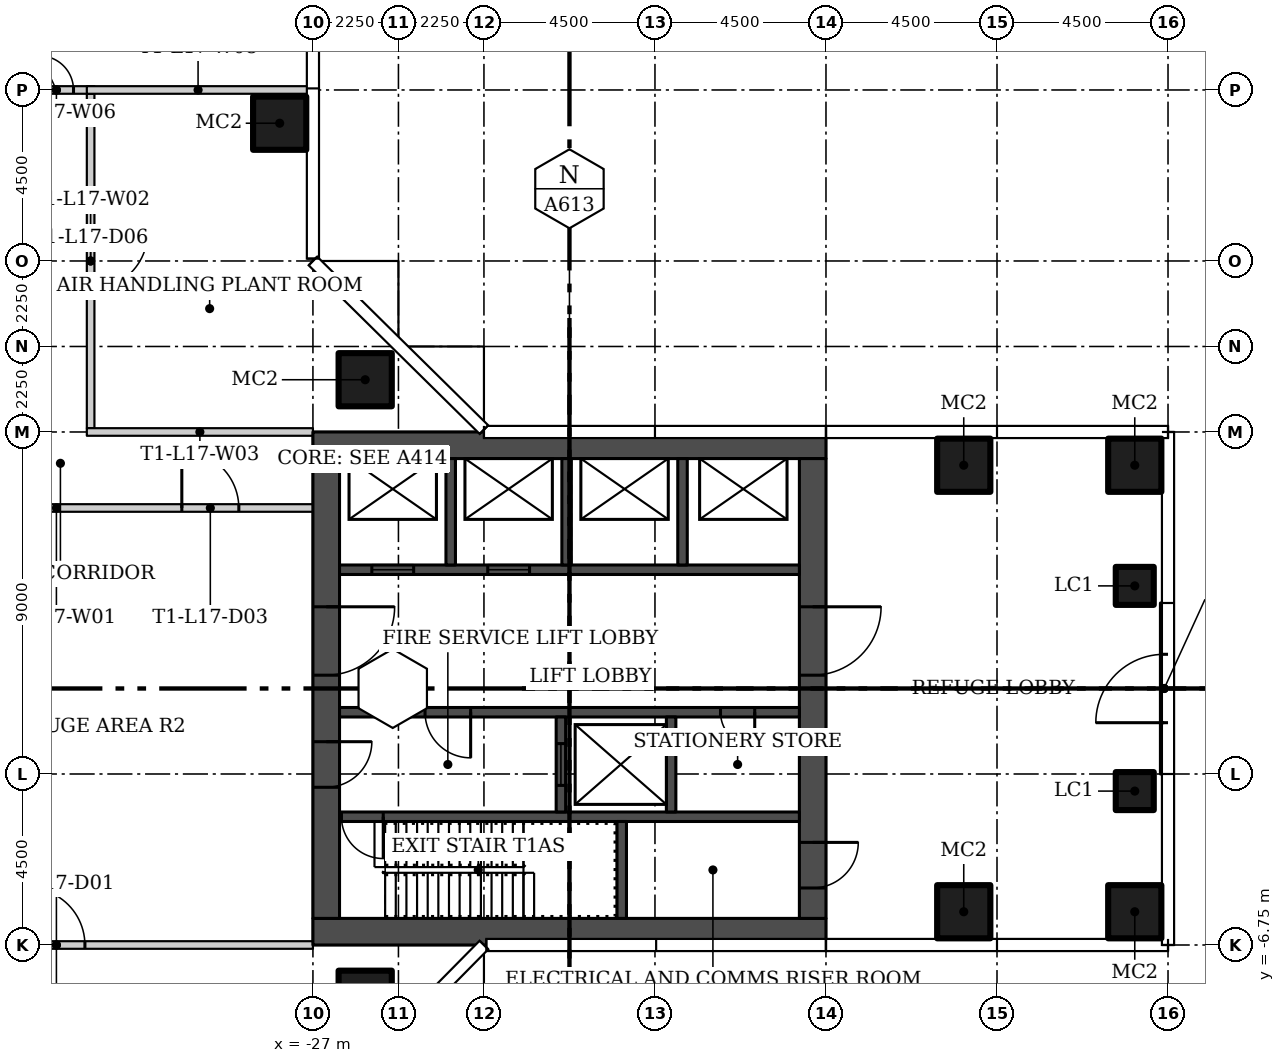
"""IFC4 building model, lengths in metres.
Left out: names, types, materials, properties, quantities, classifications, styles, units other than length and angle.
Written with IfcOpenShell. Run it as: python <this file> out.ifc"""

import sys

from ifc_helpers import new_model, si_unit, direction, frame, frame_2d, origin, origin_2d, place, context, subcontext, project, spatial, rectangle, hollow_rectangle, extrude, element, fill, save


model = new_model("IFC4")
c1 = context("Model", 3, precision=1e-05, world=origin(), true_north=direction((0.0, 1.0)))
c2 = subcontext(c1, "Body", "Model", "MODEL_VIEW")
j1 = project(units=[si_unit("LENGTHUNIT", "METRE"), si_unit("PLANEANGLEUNIT", "RADIAN")], contexts=[c1])
p1 = place(None, origin())
s1 = spatial("IfcSite", under=j1, at=p1, CompositionType="ELEMENT")
p2 = place(p1, origin())
s2 = spatial("IfcBuilding", under=s1, at=p2, CompositionType="ELEMENT")
p3 = place(p2, frame((0.0, 0.0, 77.1)))
s3 = spatial("IfcBuildingStorey", under=s2, at=p3, CompositionType="ELEMENT", Elevation=77.1)
for number, where in (
    (1, (-25.625, 8.125, 0.0)),
    (2, (-25.625, -8.125, 0.0)),
    (3, (-9.875, -5.875, 0.0)),
    (4, (-5.375, -5.875, 0.0)),
    (5, (-9.875, 5.875, 0.0)),
    (6, (-5.375, 5.875, 0.0)),
    (7, (-27.875, 14.875, 0.0)),
):
    element("IfcColumn", number, at=place(p3, frame(where)), inside=s3, PredefinedType="COLUMN", context=c2, shape_type="SweptSolid", body=[
        extrude(hollow_rectangle(XDim=1.4, YDim=1.4, WallThickness=0.05, at=origin_2d()), origin(), (0.0, 0.0, 1.0), 4.45),
    ])
for number, where in (
    (8, (-5.375, -2.7, 0.0)),
    (9, (-5.375, 2.7, 0.0)),
):
    element("IfcColumn", number, at=place(p3, frame(where)), inside=s3, PredefinedType="COLUMN", context=c2, shape_type="SweptSolid", body=[
        extrude(hollow_rectangle(XDim=1.0, YDim=1.0, WallThickness=0.04, at=origin_2d()), origin(), (0.0, 0.0, 1.0), 4.45),
    ])
p4 = place(p3, frame((-40.5, 4.75, 0.0)))
e10 = element("IfcWall", 10, at=p4, inside=s3, PredefinedType="PARTITIONING", context=c2, shape_type="SweptSolid", body=[
    extrude(rectangle(XDim=13.5, YDim=0.2, at=frame_2d((6.75, 0.0))), origin(), (0.0, 0.0, 1.0), 4.45),
])
p5 = place(p4, frame((1.95, 0.0, 0.0)))
e11 = element("IfcOpeningElement", 11, at=p5, cuts=e10, PredefinedType="OPENING", context=c2, shape_type="SweptSolid", body=[
    extrude(rectangle(XDim=1.5, YDim=2.4, at=frame_2d((0.75, 1.2))), frame((0.0, 0.11, 0.0), z_axis=(0.0, -1.0, 0.0), x_axis=(1.0, 0.0, 0.0)), (0.0, 0.0, 1.0), 0.22),
])
p6 = place(p4, frame((10.05, 0.0, 0.0)))
e12 = element("IfcOpeningElement", 12, at=p6, cuts=e10, PredefinedType="OPENING", context=c2, shape_type="SweptSolid", body=[
    extrude(rectangle(XDim=1.5, YDim=2.4, at=frame_2d((0.75, 1.2))), frame((0.0, 0.11, 0.0), z_axis=(0.0, -1.0, 0.0), x_axis=(1.0, 0.0, 0.0)), (0.0, 0.0, 1.0), 0.22),
])
p7 = place(p3, frame((-32.85, 15.65, 0.0), z_axis=(0.0, 0.0, 1.0), x_axis=(0.0, -1.0, 0.0)))
e13 = element("IfcWall", 13, at=p7, inside=s3, PredefinedType="PARTITIONING", context=c2, shape_type="SweptSolid", body=[
    extrude(rectangle(XDim=8.8, YDim=0.2, at=frame_2d((4.4, 0.0))), origin(), (0.0, 0.0, 1.0), 4.45),
])
p8 = place(p7, frame((3.65, 0.0, 0.0)))
e14 = element("IfcOpeningElement", 14, at=p8, cuts=e13, PredefinedType="OPENING", context=c2, shape_type="SweptSolid", body=[
    extrude(rectangle(XDim=1.5, YDim=2.4, at=frame_2d((0.75, 1.2))), frame((0.0, 0.11, 0.0), z_axis=(0.0, -1.0, 0.0), x_axis=(1.0, 0.0, 0.0)), (0.0, 0.0, 1.0), 0.22),
])
p9 = place(p3, frame((-32.95, 6.75, 0.0)))
e15 = element("IfcWall", 15, at=p9, inside=s3, PredefinedType="PARTITIONING", context=c2, shape_type="SweptSolid", body=[
    extrude(rectangle(XDim=5.95, YDim=0.2, at=frame_2d((2.975, 0.0))), origin(), (0.0, 0.0, 1.0), 4.45),
])
p10 = place(p3, frame((-34.75, 15.75, 0.0)))
e16 = element("IfcWall", 16, at=p10, inside=s3, PredefinedType="PARTITIONING", context=c2, shape_type="SweptSolid", body=[
    extrude(rectangle(XDim=2.001, YDim=0.2, at=frame_2d((1.0, 0.0))), origin(), (0.0, 0.0, 1.0), 4.45),
])
p11 = place(p10, frame((0.55, 0.0, 0.0)))
e17 = element("IfcOpeningElement", 17, at=p11, cuts=e16, PredefinedType="OPENING", context=c2, shape_type="SweptSolid", body=[
    extrude(rectangle(XDim=0.9, YDim=2.4, at=frame_2d((0.45, 1.2))), frame((0.0, 0.11, 0.0), z_axis=(0.0, -1.0, 0.0), x_axis=(1.0, 0.0, 0.0)), (0.0, 0.0, 1.0), 0.22),
])
p12 = place(p3, frame((-40.5, -6.75, 0.0)))
e18 = element("IfcWall", 18, at=p12, inside=s3, PredefinedType="PARTITIONING", context=c2, shape_type="SweptSolid", body=[
    extrude(rectangle(XDim=13.5, YDim=0.2, at=frame_2d((6.75, 0.0))), origin(), (0.0, 0.0, 1.0), 4.45),
])
p13 = place(p12, frame((6.0, 0.0, 0.0)))
e19 = element("IfcOpeningElement", 19, at=p13, cuts=e18, PredefinedType="OPENING", context=c2, shape_type="SweptSolid", body=[
    extrude(rectangle(XDim=1.5, YDim=2.4, at=frame_2d((0.75, 1.2))), frame((0.0, 0.11, 0.0), z_axis=(0.0, -1.0, 0.0), x_axis=(1.0, 0.0, 0.0)), (0.0, 0.0, 1.0), 0.22),
])
p14 = place(p3, frame((-27.095, 15.75, 0.0), z_axis=(0.0, 0.0, 1.0), x_axis=(-1.0, 0.0, 0.0)))
e20 = element("IfcWall", 20, at=p14, inside=s3, PredefinedType="PARTITIONING", context=c2, shape_type="SweptSolid", body=[
    extrude(rectangle(XDim=5.855, YDim=0.2, at=frame_2d((2.927, 0.0))), origin(), (0.0, 0.0, 1.0), 4.45),
])
p15 = place(p3, frame((-4.6, -2.25, 0.0), z_axis=(0.0, 0.0, 1.0), x_axis=(0.0, 1.0, 0.0)))
e21 = element("IfcWall", 21, at=p15, inside=s3, PredefinedType="PARTITIONING", context=c2, shape_type="SweptSolid", body=[
    extrude(rectangle(XDim=4.5, YDim=0.2, at=frame_2d((2.25, 0.0))), origin(), (0.0, 0.0, 1.0), 4.45),
])
p16 = place(p15, frame((1.35, 0.0, 0.0)))
e22 = element("IfcOpeningElement", 22, at=p16, cuts=e21, PredefinedType="OPENING", context=c2, shape_type="SweptSolid", body=[
    extrude(rectangle(XDim=1.8, YDim=2.1, at=frame_2d((0.9, 1.05))), frame((0.0, 0.11, 0.0), z_axis=(0.0, -1.0, 0.0), x_axis=(1.0, 0.0, 0.0)), (0.0, 0.0, 1.0), 0.22),
])
for number, where in (
    (23, (-27.0, -6.4, 0.0)),
    (24, (-27.0, 6.4, 0.0)),
):
    element("IfcWall", number, at=place(p3, frame(where)), inside=s3, PredefinedType="SHEAR", context=c2, shape_type="SweptSolid", body=[
        extrude(rectangle(XDim=13.5, YDim=0.7, at=frame_2d((6.75, 0.0))), origin(), (0.0, 0.0, 1.0), 4.45),
    ])
p17 = place(p3, frame((-26.65, 6.05, 0.0), z_axis=(0.0, 0.0, 1.0), x_axis=(0.0, -1.0, 0.0)))
e25 = element("IfcWall", 25, at=p17, inside=s3, PredefinedType="SHEAR", context=c2, shape_type="SweptSolid", body=[
    extrude(rectangle(XDim=12.1, YDim=0.7, at=frame_2d((6.05, 0.0))), origin(), (0.0, 0.0, 1.0), 4.45),
])
p18 = place(p17, frame((7.45, 0.0, 0.0)))
e26 = element("IfcOpeningElement", 26, at=p18, cuts=e25, PredefinedType="OPENING", context=c2, shape_type="SweptSolid", body=[
    extrude(rectangle(XDim=1.2, YDim=2.1, at=frame_2d((0.6, 1.05))), frame((0.0, 0.36, 0.0), z_axis=(0.0, -1.0, 0.0), x_axis=(1.0, 0.0, 0.0)), (0.0, 0.0, 1.0), 0.72),
])
p19 = place(p17, frame((3.9, 0.0, 0.0)))
e27 = element("IfcOpeningElement", 27, at=p19, cuts=e25, PredefinedType="OPENING", context=c2, shape_type="SweptSolid", body=[
    extrude(rectangle(XDim=1.8, YDim=2.4, at=frame_2d((0.9, 1.2))), frame((0.0, 0.36, 0.0), z_axis=(0.0, -1.0, 0.0), x_axis=(1.0, 0.0, 0.0)), (0.0, 0.0, 1.0), 0.72),
])
p20 = place(p3, frame((-13.85, 6.05, 0.0), z_axis=(0.0, 0.0, 1.0), x_axis=(0.0, -1.0, 0.0)))
e28 = element("IfcWall", 28, at=p20, inside=s3, PredefinedType="SHEAR", context=c2, shape_type="SweptSolid", body=[
    extrude(rectangle(XDim=12.1, YDim=0.7, at=frame_2d((6.05, 0.0))), origin(), (0.0, 0.0, 1.0), 4.45),
])
p21 = place(p20, frame((10.1, 0.0, 0.0)))
e29 = element("IfcOpeningElement", 29, at=p21, cuts=e28, PredefinedType="OPENING", context=c2, shape_type="SweptSolid", body=[
    extrude(rectangle(XDim=1.2, YDim=2.1, at=frame_2d((0.6, 1.05))), frame((0.0, 0.36, 0.0), z_axis=(0.0, -1.0, 0.0), x_axis=(1.0, 0.0, 0.0)), (0.0, 0.0, 1.0), 0.72),
])
p22 = place(p20, frame((3.9, 0.0, 0.0)))
e30 = element("IfcOpeningElement", 30, at=p22, cuts=e28, PredefinedType="OPENING", context=c2, shape_type="SweptSolid", body=[
    extrude(rectangle(XDim=1.8, YDim=2.4, at=frame_2d((0.9, 1.2))), frame((0.0, 0.36, 0.0), z_axis=(0.0, -1.0, 0.0), x_axis=(1.0, 0.0, 0.0)), (0.0, 0.0, 1.0), 0.72),
])
p23 = place(p3, frame((-14.2, -3.375, 0.0), z_axis=(0.0, 0.0, 1.0), x_axis=(-1.0, 0.0, 0.0)))
e31 = element("IfcWall", 31, at=p23, inside=s3, PredefinedType="SHEAR", context=c2, shape_type="SweptSolid", body=[
    extrude(rectangle(XDim=12.1, YDim=0.25, at=frame_2d((6.05, 0.0))), origin(), (0.0, 0.0, 1.0), 4.45),
])
p24 = place(p23, frame((10.95, 0.0, 0.0)))
e32 = element("IfcOpeningElement", 32, at=p24, cuts=e31, PredefinedType="OPENING", context=c2, shape_type="SweptSolid", body=[
    extrude(rectangle(XDim=1.1, YDim=2.1, at=frame_2d((0.55, 1.05))), frame((0.0, 0.135, 0.0), z_axis=(0.0, -1.0, 0.0), x_axis=(1.0, 0.0, 0.0)), (0.0, 0.0, 1.0), 0.27),
])
p25 = place(p3, frame((-18.875, -6.05, 0.0), z_axis=(0.0, 0.0, 1.0), x_axis=(0.0, 1.0, 0.0)))
e33 = element("IfcWall", 33, at=p25, inside=s3, PredefinedType="SHEAR", context=c2, shape_type="SweptSolid", body=[
    extrude(rectangle(XDim=2.55, YDim=0.25, at=frame_2d((1.275, 0.0))), origin(), (0.0, 0.0, 1.0), 4.45),
])
p26 = place(p3, frame((-14.2, -0.625, 0.0), z_axis=(0.0, 0.0, 1.0), x_axis=(-1.0, 0.0, 0.0)))
e34 = element("IfcWall", 34, at=p26, inside=s3, PredefinedType="SHEAR", context=c2, shape_type="SweptSolid", body=[
    extrude(rectangle(XDim=12.1, YDim=0.25, at=frame_2d((6.05, 0.0))), origin(), (0.0, 0.0, 1.0), 4.45),
])
p27 = place(p26, frame((8.65, 0.0, 0.0)))
e35 = element("IfcOpeningElement", 35, at=p27, cuts=e34, PredefinedType="OPENING", context=c2, shape_type="SweptSolid", body=[
    extrude(rectangle(XDim=1.2, YDim=2.1, at=frame_2d((0.6, 1.05))), frame((0.0, 0.135, 0.0), z_axis=(0.0, -1.0, 0.0), x_axis=(1.0, 0.0, 0.0)), (0.0, 0.0, 1.0), 0.27),
])
p28 = place(p26, frame((1.175, 0.0, 0.0)))
e36 = element("IfcOpeningElement", 36, at=p28, cuts=e34, PredefinedType="OPENING", context=c2, shape_type="SweptSolid", body=[
    extrude(rectangle(XDim=0.9, YDim=2.1, at=frame_2d((0.45, 1.05))), frame((0.0, 0.135, 0.0), z_axis=(0.0, -1.0, 0.0), x_axis=(1.0, 0.0, 0.0)), (0.0, 0.0, 1.0), 0.27),
])
p29 = place(p3, frame((-20.475, -3.25, 0.0), z_axis=(0.0, 0.0, 1.0), x_axis=(0.0, 1.0, 0.0)))
e37 = element("IfcWall", 37, at=p29, inside=s3, PredefinedType="SHEAR", context=c2, shape_type="SweptSolid", body=[
    extrude(rectangle(XDim=2.5, YDim=0.25, at=frame_2d((1.25, 0.0))), origin(), (0.0, 0.0, 1.0), 4.45),
])
p30 = place(p29, frame((0.7, 0.0, 0.0)))
e38 = element("IfcOpeningElement", 38, at=p30, cuts=e37, PredefinedType="OPENING", context=c2, shape_type="SweptSolid", body=[
    extrude(rectangle(XDim=1.1, YDim=2.1, at=frame_2d((0.55, 1.05))), frame((0.0, 0.135, 0.0), z_axis=(0.0, -1.0, 0.0), x_axis=(1.0, 0.0, 0.0)), (0.0, 0.0, 1.0), 0.27),
])
p31 = place(p3, frame((-17.575, -3.25, 0.0), z_axis=(0.0, 0.0, 1.0), x_axis=(0.0, 1.0, 0.0)))
e39 = element("IfcWall", 39, at=p31, inside=s3, PredefinedType="SHEAR", context=c2, shape_type="SweptSolid", body=[
    extrude(rectangle(XDim=2.5, YDim=0.25, at=frame_2d((1.25, 0.0))), origin(), (0.0, 0.0, 1.0), 4.45),
])
p32 = place(p3, frame((-26.3, 3.125, 0.0)))
e40 = element("IfcWall", 40, at=p32, inside=s3, PredefinedType="SHEAR", context=c2, shape_type="SweptSolid", body=[
    extrude(rectangle(XDim=12.1, YDim=0.25, at=frame_2d((6.05, 0.0))), origin(), (0.0, 0.0, 1.0), 4.45),
])
p33 = place(p32, frame((0.85, 0.0, 0.0)))
e41 = element("IfcOpeningElement", 41, at=p33, cuts=e40, PredefinedType="OPENING", context=c2, shape_type="SweptSolid", body=[
    extrude(rectangle(XDim=1.1, YDim=2.1, at=frame_2d((0.55, 1.05))), frame((0.0, 0.135, 0.0), z_axis=(0.0, -1.0, 0.0), x_axis=(1.0, 0.0, 0.0)), (0.0, 0.0, 1.0), 0.27),
])
p34 = place(p32, frame((3.9, 0.0, 0.0)))
e42 = element("IfcOpeningElement", 42, at=p34, cuts=e40, PredefinedType="OPENING", context=c2, shape_type="SweptSolid", body=[
    extrude(rectangle(XDim=1.1, YDim=2.1, at=frame_2d((0.55, 1.05))), frame((0.0, 0.135, 0.0), z_axis=(0.0, -1.0, 0.0), x_axis=(1.0, 0.0, 0.0)), (0.0, 0.0, 1.0), 0.27),
])
for number, where, z_axis, x_axis in (
    (43, (-23.375, 3.25, 0.0), (0.0, 0.0, 1.0), (0.0, 1.0, 0.0)),
    (44, (-20.325, 3.25, 0.0), (0.0, 0.0, 1.0), (0.0, 1.0, 0.0)),
    (45, (-17.275, 3.25, 0.0), (0.0, 0.0, 1.0), (0.0, 1.0, 0.0)),
):
    element("IfcWall", number, at=place(p3, frame(where, z_axis=z_axis, x_axis=x_axis)), inside=s3, PredefinedType="SHEAR", context=c2, shape_type="SweptSolid", body=[
        extrude(rectangle(XDim=2.8, YDim=0.25, at=frame_2d((1.4, 0.0))), origin(), (0.0, 0.0, 1.0), 4.45),
    ])
p35 = place(p13, origin())
e46 = element("IfcDoor", 46, at=p35, inside=s3, OperationType="DOUBLE_DOOR_SINGLE_SWING", PredefinedType="DOOR", context=c2, shape_type="SweptSolid", body=[
    extrude(rectangle(XDim=1.5, YDim=2.4, at=frame_2d((0.75, 1.2))), frame((0.0, 0.025, 0.0), z_axis=(0.0, -1.0, 0.0), x_axis=(1.0, 0.0, 0.0)), (0.0, 0.0, 1.0), 0.05),
])
fill(e19, e46)
p36 = place(p6, origin())
e47 = element("IfcDoor", 47, at=p36, inside=s3, OperationType="DOUBLE_DOOR_SINGLE_SWING", PredefinedType="DOOR", context=c2, shape_type="SweptSolid", body=[
    extrude(rectangle(XDim=1.5, YDim=2.4, at=frame_2d((0.75, 1.2))), frame((0.0, 0.025, 0.0), z_axis=(0.0, -1.0, 0.0), x_axis=(1.0, 0.0, 0.0)), (0.0, 0.0, 1.0), 0.05),
])
fill(e12, e47)
p37 = place(p11, origin())
e48 = element("IfcDoor", 48, at=p37, inside=s3, OperationType="SINGLE_SWING_RIGHT", PredefinedType="DOOR", context=c2, shape_type="SweptSolid", body=[
    extrude(rectangle(XDim=0.9, YDim=2.4, at=frame_2d((0.45, 1.2))), frame((0.0, 0.025, 0.0), z_axis=(0.0, -1.0, 0.0), x_axis=(1.0, 0.0, 0.0)), (0.0, 0.0, 1.0), 0.05),
])
fill(e17, e48)
p38 = place(p8, origin())
e49 = element("IfcDoor", 49, at=p38, inside=s3, OperationType="DOUBLE_DOOR_SINGLE_SWING", PredefinedType="DOOR", context=c2, shape_type="SweptSolid", body=[
    extrude(rectangle(XDim=1.5, YDim=2.4, at=frame_2d((0.75, 1.2))), frame((0.0, 0.025, 0.0), z_axis=(0.0, -1.0, 0.0), x_axis=(1.0, 0.0, 0.0)), (0.0, 0.0, 1.0), 0.05),
])
fill(e14, e49)
p39 = place(p16, origin())
e50 = element("IfcDoor", 50, at=p39, inside=s3, OperationType="DOUBLE_DOOR_SINGLE_SWING", PredefinedType="DOOR", context=c2, shape_type="SweptSolid", body=[
    extrude(rectangle(XDim=1.8, YDim=2.1, at=frame_2d((0.9, 1.05))), frame((0.0, 0.025, 0.0), z_axis=(0.0, -1.0, 0.0), x_axis=(1.0, 0.0, 0.0)), (0.0, 0.0, 1.0), 0.05),
])
fill(e22, e50)
p40 = place(p18, origin())
e51 = element("IfcDoor", 51, at=p40, inside=s3, OperationType="SINGLE_SWING_RIGHT", PredefinedType="DOOR", context=c2, shape_type="SweptSolid", body=[
    extrude(rectangle(XDim=1.2, YDim=2.1, at=frame_2d((0.6, 1.05))), frame((0.0, 0.025, 0.0), z_axis=(0.0, -1.0, 0.0), x_axis=(1.0, 0.0, 0.0)), (0.0, 0.0, 1.0), 0.05),
])
fill(e26, e51)
p41 = place(p19, origin())
e52 = element("IfcDoor", 52, at=p41, inside=s3, OperationType="DOUBLE_DOOR_SINGLE_SWING", PredefinedType="DOOR", context=c2, shape_type="SweptSolid", body=[
    extrude(rectangle(XDim=1.8, YDim=2.4, at=frame_2d((0.9, 1.2))), frame((0.0, 0.025, 0.0), z_axis=(0.0, -1.0, 0.0), x_axis=(1.0, 0.0, 0.0)), (0.0, 0.0, 1.0), 0.05),
])
fill(e27, e52)
p42 = place(p21, origin())
e53 = element("IfcDoor", 53, at=p42, inside=s3, OperationType="SINGLE_SWING_RIGHT", PredefinedType="DOOR", context=c2, shape_type="SweptSolid", body=[
    extrude(rectangle(XDim=1.2, YDim=2.1, at=frame_2d((0.6, 1.05))), frame((0.0, 0.025, 0.0), z_axis=(0.0, -1.0, 0.0), x_axis=(1.0, 0.0, 0.0)), (0.0, 0.0, 1.0), 0.05),
])
fill(e29, e53)
p43 = place(p22, origin())
e54 = element("IfcDoor", 54, at=p43, inside=s3, OperationType="DOUBLE_DOOR_SINGLE_SWING", PredefinedType="DOOR", context=c2, shape_type="SweptSolid", body=[
    extrude(rectangle(XDim=1.8, YDim=2.4, at=frame_2d((0.9, 1.2))), frame((0.0, 0.025, 0.0), z_axis=(0.0, -1.0, 0.0), x_axis=(1.0, 0.0, 0.0)), (0.0, 0.0, 1.0), 0.05),
])
fill(e30, e54)
p44 = place(p24, origin())
e55 = element("IfcDoor", 55, at=p44, inside=s3, OperationType="SINGLE_SWING_RIGHT", PredefinedType="DOOR", context=c2, shape_type="SweptSolid", body=[
    extrude(rectangle(XDim=1.1, YDim=2.1, at=frame_2d((0.55, 1.05))), frame((0.0, 0.025, 0.0), z_axis=(0.0, -1.0, 0.0), x_axis=(1.0, 0.0, 0.0)), (0.0, 0.0, 1.0), 0.05),
])
fill(e32, e55)
p45 = place(p27, origin())
e56 = element("IfcDoor", 56, at=p45, inside=s3, OperationType="SINGLE_SWING_RIGHT", PredefinedType="DOOR", context=c2, shape_type="SweptSolid", body=[
    extrude(rectangle(XDim=1.2, YDim=2.1, at=frame_2d((0.6, 1.05))), frame((0.0, 0.025, 0.0), z_axis=(0.0, -1.0, 0.0), x_axis=(1.0, 0.0, 0.0)), (0.0, 0.0, 1.0), 0.05),
])
fill(e35, e56)
p46 = place(p28, origin())
e57 = element("IfcDoor", 57, at=p46, inside=s3, OperationType="SINGLE_SWING_LEFT", PredefinedType="DOOR", context=c2, shape_type="SweptSolid", body=[
    extrude(rectangle(XDim=0.9, YDim=2.1, at=frame_2d((0.45, 1.05))), frame((0.0, 0.025, 0.0), z_axis=(0.0, -1.0, 0.0), x_axis=(1.0, 0.0, 0.0)), (0.0, 0.0, 1.0), 0.05),
])
fill(e36, e57)
p47 = place(p30, origin())
e58 = element("IfcDoor", 58, at=p47, inside=s3, OperationType="SLIDING_TO_LEFT", PredefinedType="DOOR", context=c2, shape_type="SweptSolid", body=[
    extrude(rectangle(XDim=1.1, YDim=2.1, at=frame_2d((0.55, 1.05))), frame((0.0, 0.025, 0.0), z_axis=(0.0, -1.0, 0.0), x_axis=(1.0, 0.0, 0.0)), (0.0, 0.0, 1.0), 0.05),
])
fill(e38, e58)
p48 = place(p33, origin())
e59 = element("IfcDoor", 59, at=p48, inside=s3, OperationType="SLIDING_TO_LEFT", PredefinedType="DOOR", context=c2, shape_type="SweptSolid", body=[
    extrude(rectangle(XDim=1.1, YDim=2.1, at=frame_2d((0.55, 1.05))), frame((0.0, 0.025, 0.0), z_axis=(0.0, -1.0, 0.0), x_axis=(1.0, 0.0, 0.0)), (0.0, 0.0, 1.0), 0.05),
])
fill(e41, e59)
p49 = place(p34, origin())
e60 = element("IfcDoor", 60, at=p49, inside=s3, OperationType="SLIDING_TO_LEFT", PredefinedType="DOOR", context=c2, shape_type="SweptSolid", body=[
    extrude(rectangle(XDim=1.1, YDim=2.1, at=frame_2d((0.55, 1.05))), frame((0.0, 0.025, 0.0), z_axis=(0.0, -1.0, 0.0), x_axis=(1.0, 0.0, 0.0)), (0.0, 0.0, 1.0), 0.05),
])
fill(e42, e60)
save(model, sys.argv[1])
